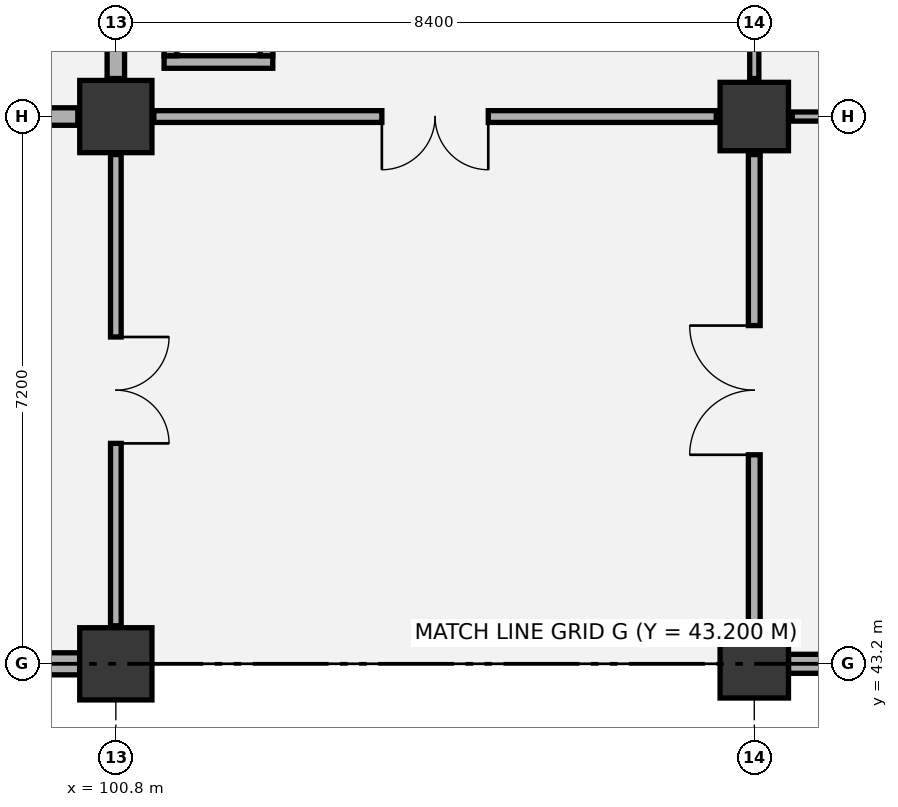
"""IFC4 building model, lengths in metres.
Left out: names, types, materials, properties, quantities, classifications, styles, units other than length and angle.
Written with IfcOpenShell. Run it as: python <this file> out.ifc"""

import sys

from ifc_helpers import new_model, si_unit, direction, frame, frame_2d, origin, origin_2d, place, context, subcontext, project, spatial, rectangle, extrude, element, fill, save


model = new_model("IFC4")
c1 = context("Model", 3, precision=1e-05, world=origin(), true_north=direction((0.0, 1.0)))
c2 = subcontext(c1, "Body", "Model", "MODEL_VIEW")
j1 = project(units=[si_unit("LENGTHUNIT", "METRE"), si_unit("PLANEANGLEUNIT", "RADIAN")], contexts=[c1])
p1 = place(None, origin())
s1 = spatial("IfcSite", under=j1, at=p1, CompositionType="ELEMENT")
p2 = place(p1, origin())
s2 = spatial("IfcBuilding", under=s1, at=p2, CompositionType="ELEMENT")
p3 = place(p2, frame((0.0, 0.0, 6.0)))
s3 = spatial("IfcBuildingStorey", under=s2, at=p3, CompositionType="ELEMENT", Elevation=6.0)
for number, where, z_axis, x_axis in (
    (1, (100.8, 43.2, 0.0), (0.0, 0.0, 1.0), (1.0, 0.0, 0.0)),
    (2, (100.8, 50.4, 0.0), (0.0, 0.0, 1.0), (1.0, 0.0, 0.0)),
):
    element("IfcColumn", number, at=place(p3, frame(where, z_axis=z_axis, x_axis=x_axis)), inside=s3, PredefinedType="COLUMN", context=c2, shape_type="SweptSolid", body=[
        extrude(rectangle(XDim=0.95, YDim=0.95, at=origin_2d()), origin(), (0.0, 0.0, 1.0), 5.4),
    ])
for number, where, z_axis, x_axis in (
    (3, (109.2, 43.2, 0.0), (0.0, 0.0, 1.0), (1.0, 0.0, 0.0)),
    (4, (109.2, 50.4, 0.0), (0.0, 0.0, 1.0), (1.0, 0.0, 0.0)),
):
    element("IfcColumn", number, at=place(p3, frame(where, z_axis=z_axis, x_axis=x_axis)), inside=s3, PredefinedType="COLUMN", context=c2, shape_type="SweptSolid", body=[
        extrude(rectangle(XDim=0.9, YDim=0.9, at=origin_2d()), origin(), (0.0, 0.0, 1.0), 5.4),
    ])
p4 = place(p3, frame((92.85, 43.2, 0.0), z_axis=(0.0, 0.0, 1.0), x_axis=(1.0, 0.0, 0.0)))
e5 = element("IfcWall", 5, at=p4, inside=s3, PredefinedType="SOLIDWALL", context=c2, shape_type="SweptSolid", body=[
    extrude(rectangle(XDim=7.475, YDim=0.29, at=frame_2d((3.737, 0.0))), origin(), (0.0, 0.0, 1.0), 4.42),
])
p5 = place(p4, frame((0.892, 0.0, 0.9)))
e6 = element("IfcOpeningElement", 6, at=p5, cuts=e5, PredefinedType="OPENING", context=c2, shape_type="SweptSolid", body=[
    extrude(rectangle(XDim=2.4, YDim=2.1, at=frame_2d((1.2, 1.05))), frame((0.0, 0.155, 0.0), z_axis=(0.0, -1.0, 0.0), x_axis=(1.0, 0.0, 0.0)), (0.0, 0.0, 1.0), 0.31),
])
p6 = place(p4, frame((4.183, 0.0, 0.9)))
e7 = element("IfcOpeningElement", 7, at=p6, cuts=e5, PredefinedType="OPENING", context=c2, shape_type="SweptSolid", body=[
    extrude(rectangle(XDim=2.4, YDim=2.1, at=frame_2d((1.2, 1.05))), frame((0.0, 0.155, 0.0), z_axis=(0.0, -1.0, 0.0), x_axis=(1.0, 0.0, 0.0)), (0.0, 0.0, 1.0), 0.31),
])
p7 = place(p3, frame((109.65, 43.2, 0.0), z_axis=(0.0, 0.0, 1.0), x_axis=(1.0, 0.0, 0.0)))
e8 = element("IfcWall", 8, at=p7, inside=s3, PredefinedType="SOLIDWALL", context=c2, shape_type="SweptSolid", body=[
    extrude(rectangle(XDim=7.5, YDim=0.25, at=frame_2d((3.75, 0.0))), origin(), (0.0, 0.0, 1.0), 4.42),
])
p8 = place(p7, frame((2.25, 0.0, 0.9)))
e9 = element("IfcOpeningElement", 9, at=p8, cuts=e8, PredefinedType="OPENING", context=c2, shape_type="SweptSolid", body=[
    extrude(rectangle(XDim=3.0, YDim=2.1, at=frame_2d((1.5, 1.05))), frame((0.0, 0.135, 0.0), z_axis=(0.0, -1.0, 0.0), x_axis=(1.0, 0.0, 0.0)), (0.0, 0.0, 1.0), 0.27),
])
p9 = place(p3, frame((101.435, 51.117, 0.0), z_axis=(0.0, 0.0, 1.0), x_axis=(1.0, 0.0, 0.0)))
e10 = element("IfcWall", 10, at=p9, inside=s3, PredefinedType="PARTITIONING", context=c2, shape_type="SweptSolid", body=[
    extrude(rectangle(XDim=1.43, YDim=0.165, at=frame_2d((0.715, 0.0))), origin(), (0.0, 0.0, 1.0), 5.075),
])
for number, where, z_axis, x_axis in (
    (11, (101.518, 51.2, 0.0), (0.0, 0.0, 1.0), (0.0, 1.0, 0.0)),
    (12, (102.782, 51.2, 0.0), (0.0, 0.0, 1.0), (0.0, 1.0, 0.0)),
):
    element("IfcWall", number, at=place(p3, frame(where, z_axis=z_axis, x_axis=x_axis)), inside=s3, PredefinedType="PARTITIONING", context=c2, shape_type="SweptSolid", body=[
        extrude(rectangle(XDim=0.8, YDim=0.165, at=frame_2d((0.4, 0.0))), origin(), (0.0, 0.0, 1.0), 5.075),
    ])
p10 = place(p3, frame((100.8, 43.7, 0.0), z_axis=(0.0, 0.0, 1.0), x_axis=(0.0, 1.0, 0.0)))
e13 = element("IfcWall", 13, at=p10, inside=s3, PredefinedType="PARTITIONING", context=c2, shape_type="SweptSolid", body=[
    extrude(rectangle(XDim=6.2, YDim=0.14, at=frame_2d((3.1, 0.0))), origin(), (0.0, 0.0, 1.0), 4.32),
])
p11 = place(p10, frame((2.4, 0.0, 0.0)))
e14 = element("IfcOpeningElement", 14, at=p11, cuts=e13, PredefinedType="OPENING", context=c2, shape_type="SweptSolid", body=[
    extrude(rectangle(XDim=1.4, YDim=2.15, at=frame_2d((0.7, 1.075))), frame((0.0, 0.08, 0.0), z_axis=(0.0, -1.0, 0.0), x_axis=(1.0, 0.0, 0.0)), (0.0, 0.0, 1.0), 0.16),
])
p12 = place(p3, frame((92.9, 50.4, 0.0), z_axis=(0.0, 0.0, 1.0), x_axis=(1.0, 0.0, 0.0)))
e15 = element("IfcWall", 15, at=p12, inside=s3, PredefinedType="PARTITIONING", context=c2, shape_type="SweptSolid", body=[
    extrude(rectangle(XDim=7.4, YDim=0.23, at=frame_2d((3.7, 0.0))), origin(), (0.0, 0.0, 1.0), 4.27),
])
p13 = place(p12, frame((2.95, 0.0, 0.0)))
e16 = element("IfcOpeningElement", 16, at=p13, cuts=e15, PredefinedType="OPENING", context=c2, shape_type="SweptSolid", body=[
    extrude(rectangle(XDim=1.5, YDim=2.15, at=frame_2d((0.75, 1.075))), frame((0.0, 0.125, 0.0), z_axis=(0.0, -1.0, 0.0), x_axis=(1.0, 0.0, 0.0)), (0.0, 0.0, 1.0), 0.25),
])
p14 = place(p3, frame((100.8, 50.9, 0.0), z_axis=(0.0, 0.0, 1.0), x_axis=(0.0, 1.0, 0.0)))
e17 = element("IfcWall", 17, at=p14, inside=s3, PredefinedType="PARTITIONING", context=c2, shape_type="SweptSolid", body=[
    extrude(rectangle(XDim=6.2, YDim=0.23, at=frame_2d((3.1, 0.0))), origin(), (0.0, 0.0, 1.0), 4.78),
])
p15 = place(p3, frame((109.2, 43.7, 0.0), z_axis=(0.0, 0.0, 1.0), x_axis=(0.0, 1.0, 0.0)))
e18 = element("IfcWall", 18, at=p15, inside=s3, PredefinedType="PARTITIONING", context=c2, shape_type="SweptSolid", body=[
    extrude(rectangle(XDim=6.2, YDim=0.155, at=frame_2d((3.1, 0.0))), origin(), (0.0, 0.0, 1.0), 4.78),
])
p16 = place(p15, frame((2.25, 0.0, 0.0)))
e19 = element("IfcOpeningElement", 19, at=p16, cuts=e18, PredefinedType="OPENING", context=c2, shape_type="SweptSolid", body=[
    extrude(rectangle(XDim=1.7, YDim=2.25, at=frame_2d((0.85, 1.125))), frame((0.0, 0.087, 0.0), z_axis=(0.0, -1.0, 0.0), x_axis=(1.0, 0.0, 0.0)), (0.0, 0.0, 1.0), 0.175),
])
p17 = place(p3, frame((101.3, 50.4, 0.0), z_axis=(0.0, 0.0, 1.0), x_axis=(1.0, 0.0, 0.0)))
e20 = element("IfcWall", 20, at=p17, inside=s3, PredefinedType="PARTITIONING", context=c2, shape_type="SweptSolid", body=[
    extrude(rectangle(XDim=7.4, YDim=0.155, at=frame_2d((3.7, 0.0))), origin(), (0.0, 0.0, 1.0), 4.27),
])
p18 = place(p17, frame((3.0, 0.0, 0.0)))
e21 = element("IfcOpeningElement", 21, at=p18, cuts=e20, PredefinedType="OPENING", context=c2, shape_type="SweptSolid", body=[
    extrude(rectangle(XDim=1.4, YDim=2.15, at=frame_2d((0.7, 1.075))), frame((0.0, 0.087, 0.0), z_axis=(0.0, -1.0, 0.0), x_axis=(1.0, 0.0, 0.0)), (0.0, 0.0, 1.0), 0.175),
])
p19 = place(p3, frame((109.2, 50.9, 0.0), z_axis=(0.0, 0.0, 1.0), x_axis=(0.0, 1.0, 0.0)))
e22 = element("IfcWall", 22, at=p19, inside=s3, PredefinedType="PARTITIONING", context=c2, shape_type="SweptSolid", body=[
    extrude(rectangle(XDim=6.2, YDim=0.12, at=frame_2d((3.1, 0.0))), origin(), (0.0, 0.0, 1.0), 4.32),
])
p20 = place(p3, frame((109.7, 50.4, 0.0), z_axis=(0.0, 0.0, 1.0), x_axis=(1.0, 0.0, 0.0)))
e23 = element("IfcWall", 23, at=p20, inside=s3, PredefinedType="PARTITIONING", context=c2, shape_type="SweptSolid", body=[
    extrude(rectangle(XDim=7.4, YDim=0.12, at=frame_2d((3.7, 0.0))), origin(), (0.0, 0.0, 1.0), 4.27),
])
p21 = place(p11, frame((1.4, 0.0, 0.0), z_axis=(0.0, 0.0, 1.0), x_axis=(-1.0, 0.0, 0.0)))
e24 = element("IfcDoor", 24, at=p21, inside=s3, OperationType="DOUBLE_DOOR_SINGLE_SWING", PredefinedType="DOOR", context=c2, shape_type="SweptSolid", body=[
    extrude(rectangle(XDim=1.4, YDim=2.15, at=frame_2d((0.7, 1.075))), frame((0.0, 0.025, 0.0), z_axis=(0.0, -1.0, 0.0), x_axis=(1.0, 0.0, 0.0)), (0.0, 0.0, 1.0), 0.05),
])
fill(e14, e24)
p22 = place(p16, origin())
e25 = element("IfcDoor", 25, at=p22, inside=s3, OperationType="DOUBLE_DOOR_SINGLE_SWING", PredefinedType="DOOR", context=c2, shape_type="SweptSolid", body=[
    extrude(rectangle(XDim=1.7, YDim=2.25, at=frame_2d((0.85, 1.125))), frame((0.0, 0.025, 0.0), z_axis=(0.0, -1.0, 0.0), x_axis=(1.0, 0.0, 0.0)), (0.0, 0.0, 1.0), 0.05),
])
fill(e19, e25)
p23 = place(p18, frame((1.4, 0.0, 0.0), z_axis=(0.0, 0.0, 1.0), x_axis=(-1.0, 0.0, 0.0)))
e26 = element("IfcDoor", 26, at=p23, inside=s3, OperationType="DOUBLE_DOOR_SINGLE_SWING", PredefinedType="DOOR", context=c2, shape_type="SweptSolid", body=[
    extrude(rectangle(XDim=1.4, YDim=2.15, at=frame_2d((0.7, 1.075))), frame((0.0, 0.025, 0.0), z_axis=(0.0, -1.0, 0.0), x_axis=(1.0, 0.0, 0.0)), (0.0, 0.0, 1.0), 0.05),
])
fill(e21, e26)
save(model, sys.argv[1])
